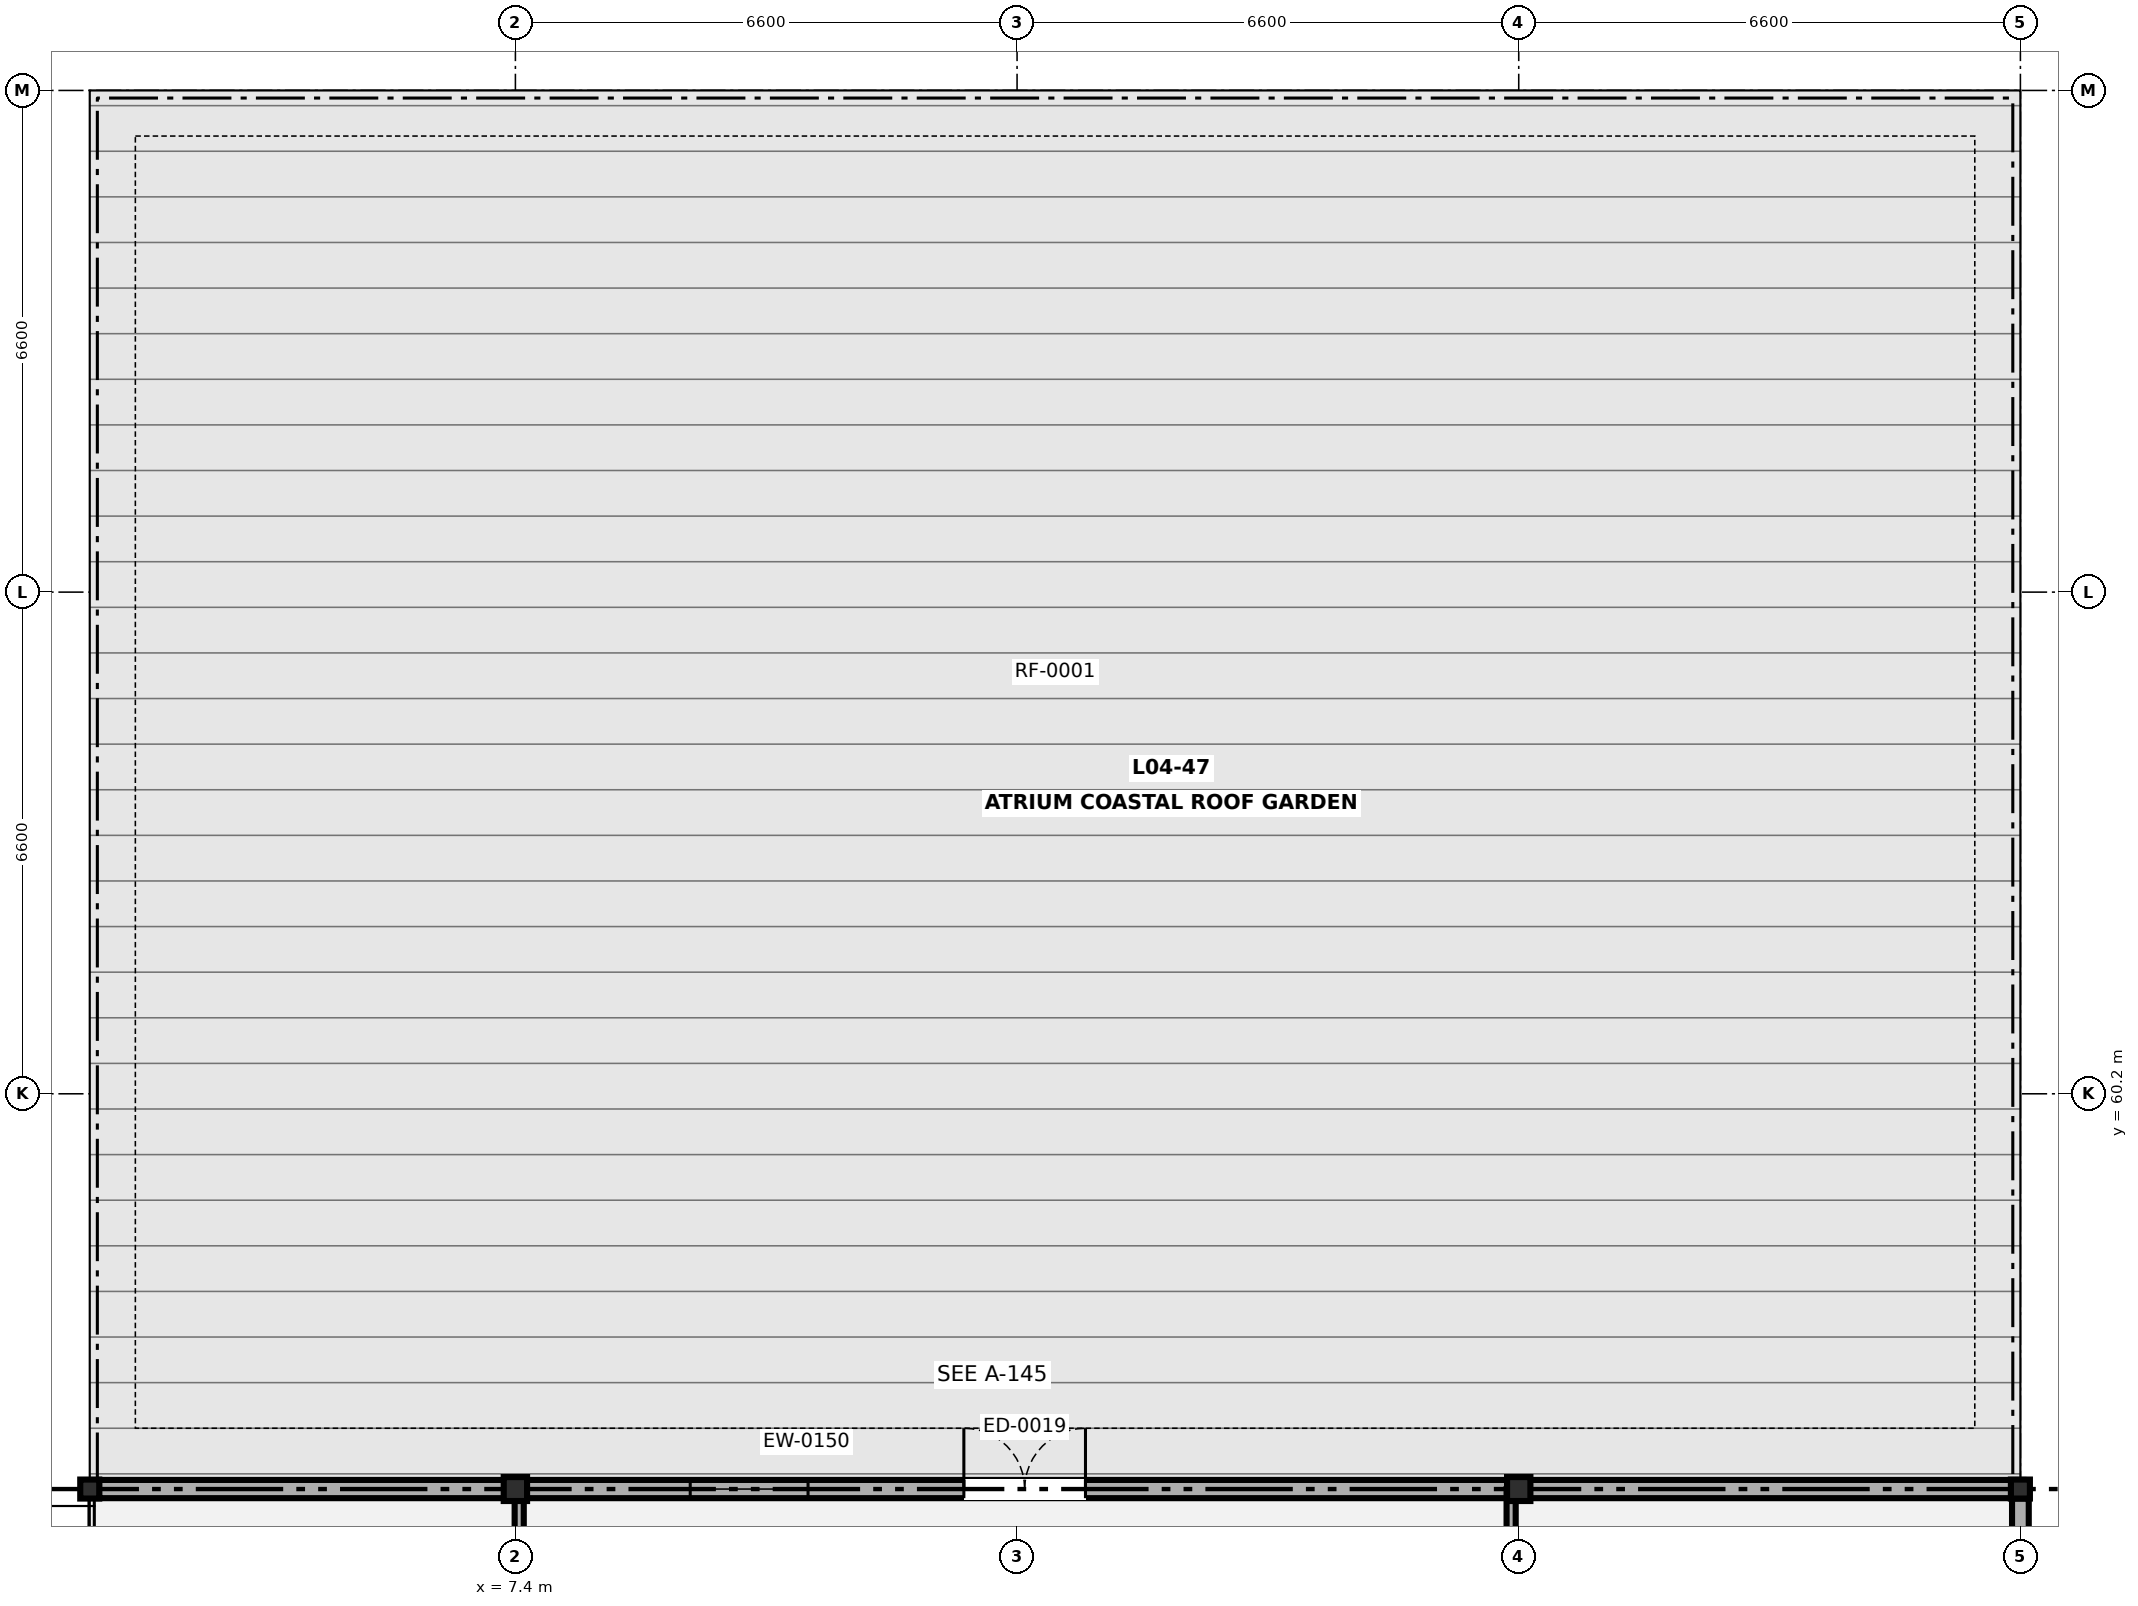
"""IFC4 building model, lengths in metres.
Left out: names, types, materials, properties, quantities, classifications, styles, units other than length and angle.
Written with IfcOpenShell. Run it as: python <this file> out.ifc"""

import sys

from ifc_helpers import new_model, si_unit, direction, frame, frame_2d, origin, origin_2d, place, context, subcontext, project, spatial, rectangle, hollow_rectangle, i_section, extrude, element, fill, save


model = new_model("IFC4")
c1 = context("Model", 3, precision=1e-05, world=origin(), true_north=direction((0.0, 1.0)))
c2 = subcontext(c1, "Body", "Model", "MODEL_VIEW")
j1 = project(units=[si_unit("LENGTHUNIT", "METRE"), si_unit("PLANEANGLEUNIT", "RADIAN")], contexts=[c1])
p1 = place(None, origin())
s1 = spatial("IfcSite", under=j1, at=p1, CompositionType="ELEMENT")
p2 = place(p1, origin())
s2 = spatial("IfcBuilding", under=s1, at=p2, CompositionType="ELEMENT")
p3 = place(p2, frame((0.0, 0.0, 17.5)))
s3 = spatial("IfcBuildingStorey", under=s2, at=p3, CompositionType="ELEMENT", Elevation=17.5)
p4 = place(p3, frame((1.8, 55.0, 0.0), z_axis=(0.0, 0.0, 1.0), x_axis=(1.0, 0.0, 0.0)))
e1 = element("IfcColumn", 1, at=p4, inside=s3, PredefinedType="COLUMN", context=c2, shape_type="SweptSolid", body=[
    extrude(hollow_rectangle(XDim=0.25, YDim=0.25, WallThickness=0.012, at=origin_2d()), origin(), (0.0, 0.0, 1.0), 4.2),
])
for number, where, z_axis, x_axis in (
    (2, (7.4, 55.0, 0.0), (0.0, 0.0, 1.0), (1.0, 0.0, 0.0)),
    (3, (20.6, 55.0, 0.0), (0.0, 0.0, 1.0), (1.0, 0.0, 0.0)),
):
    element("IfcColumn", number, at=place(p3, frame(where, z_axis=z_axis, x_axis=x_axis)), inside=s3, PredefinedType="COLUMN", context=c2, shape_type="SweptSolid", body=[
        extrude(i_section(OverallWidth=0.307, OverallDepth=0.315, WebThickness=0.012, FlangeThickness=0.019, FilletRadius=0.017, at=origin_2d()), origin(), (0.0, 0.0, 1.0), 4.2),
    ])
p5 = place(p3, frame((27.2, 55.0, 0.0), z_axis=(0.0, 0.0, 1.0), x_axis=(1.0, 0.0, 0.0)))
e4 = element("IfcColumn", 4, at=p5, inside=s3, PredefinedType="COLUMN", context=c2, shape_type="SweptSolid", body=[
    extrude(hollow_rectangle(XDim=0.25, YDim=0.25, WallThickness=0.012, at=origin_2d()), origin(), (0.0, 0.0, 1.0), 4.2),
])
p6 = place(p3, frame((1.923, 55.0, 0.0), z_axis=(0.0, 0.0, 1.0), x_axis=(1.0, 0.0, 0.0)))
e5 = element("IfcWall", 5, at=p6, inside=s3, PredefinedType="SOLIDWALL", context=c2, shape_type="SweptSolid", body=[
    extrude(rectangle(XDim=25.154, YDim=0.24, at=frame_2d((12.577, 0.0))), origin(), (0.0, 0.0, 1.0), 3.505),
])
p7 = place(p6, frame((11.377, 0.0, 0.0)))
e6 = element("IfcOpeningElement", 6, at=p7, cuts=e5, PredefinedType="OPENING", context=c2, shape_type="SweptSolid", body=[
    extrude(rectangle(XDim=1.6, YDim=2.15, at=frame_2d((0.8, 1.075))), frame((0.0, 0.13, 0.0), z_axis=(0.0, -1.0, 0.0), x_axis=(1.0, 0.0, 0.0)), (0.0, 0.0, 1.0), 0.26),
])
p8 = place(p6, frame((7.777, 0.0, 0.85)))
e7 = element("IfcOpeningElement", 7, at=p8, cuts=e5, PredefinedType="OPENING", context=c2, shape_type="SweptSolid", body=[
    extrude(rectangle(XDim=1.55, YDim=1.4, at=frame_2d((0.775, 0.7))), frame((0.0, 0.13, 0.0), z_axis=(0.0, -1.0, 0.0), x_axis=(1.0, 0.0, 0.0)), (0.0, 0.0, 1.0), 0.26),
])
p9 = place(p3, frame((27.2, 54.877, 0.0), z_axis=(0.0, 0.0, 1.0), x_axis=(0.0, -1.0, 0.0)))
e8 = element("IfcWall", 8, at=p9, inside=s3, PredefinedType="SOLIDWALL", context=c2, shape_type="SweptSolid", body=[
    extrude(rectangle(XDim=23.554, YDim=0.22, at=frame_2d((11.777, 0.0))), origin(), (0.0, 0.0, 1.0), 3.445),
])
p10 = place(p9, frame((11.077, 0.0, 0.85)))
e9 = element("IfcOpeningElement", 9, at=p10, cuts=e8, PredefinedType="OPENING", context=c2, shape_type="SweptSolid", body=[
    extrude(rectangle(XDim=1.4, YDim=1.4, at=frame_2d((0.7, 0.7))), frame((0.0, 0.12, 0.0), z_axis=(0.0, -1.0, 0.0), x_axis=(1.0, 0.0, 0.0)), (0.0, 0.0, 1.0), 0.24),
])
p11 = place(p3, frame((7.45, 42.212, 0.0), z_axis=(0.0, 0.0, 1.0), x_axis=(0.0, 1.0, 0.0)))
e10 = element("IfcWall", 10, at=p11, inside=s3, PredefinedType="PARTITIONING", context=c2, shape_type="SweptSolid", body=[
    extrude(rectangle(XDim=12.788, YDim=0.12, at=frame_2d((6.394, 0.0))), origin(), (0.0, 0.0, 1.0), 3.445),
])
p12 = place(p3, frame((20.5, 42.15, 0.0), z_axis=(0.0, 0.0, 1.0), x_axis=(0.0, 1.0, 0.0)))
e11 = element("IfcWall", 11, at=p12, inside=s3, PredefinedType="PARTITIONING", context=c2, shape_type="SweptSolid", body=[
    extrude(rectangle(XDim=12.85, YDim=0.12, at=frame_2d((6.425, 0.0))), origin(), (0.0, 0.0, 1.0), 3.445),
])
p13 = place(p7, origin())
e12 = element("IfcDoor", 12, at=p13, inside=s3, OperationType="DOUBLE_DOOR_SINGLE_SWING", PredefinedType="DOOR", context=c2, shape_type="SweptSolid", body=[
    extrude(rectangle(XDim=1.6, YDim=2.15, at=frame_2d((0.8, 1.075))), frame((0.0, 0.025, 0.0), z_axis=(0.0, -1.0, 0.0), x_axis=(1.0, 0.0, 0.0)), (0.0, 0.0, 1.0), 0.05),
])
fill(e6, e12)
p14 = place(p8, origin())
e13 = element("IfcWindow", 13, at=p14, inside=s3, PartitioningType="SINGLE_PANEL", PredefinedType="WINDOW", context=c2, shape_type="SweptSolid", body=[
    extrude(rectangle(XDim=1.55, YDim=1.4, at=frame_2d((0.775, 0.7))), frame((0.0, 0.03, 0.0), z_axis=(0.0, -1.0, 0.0), x_axis=(1.0, 0.0, 0.0)), (0.0, 0.0, 1.0), 0.06),
])
fill(e7, e13)
save(model, sys.argv[1])
